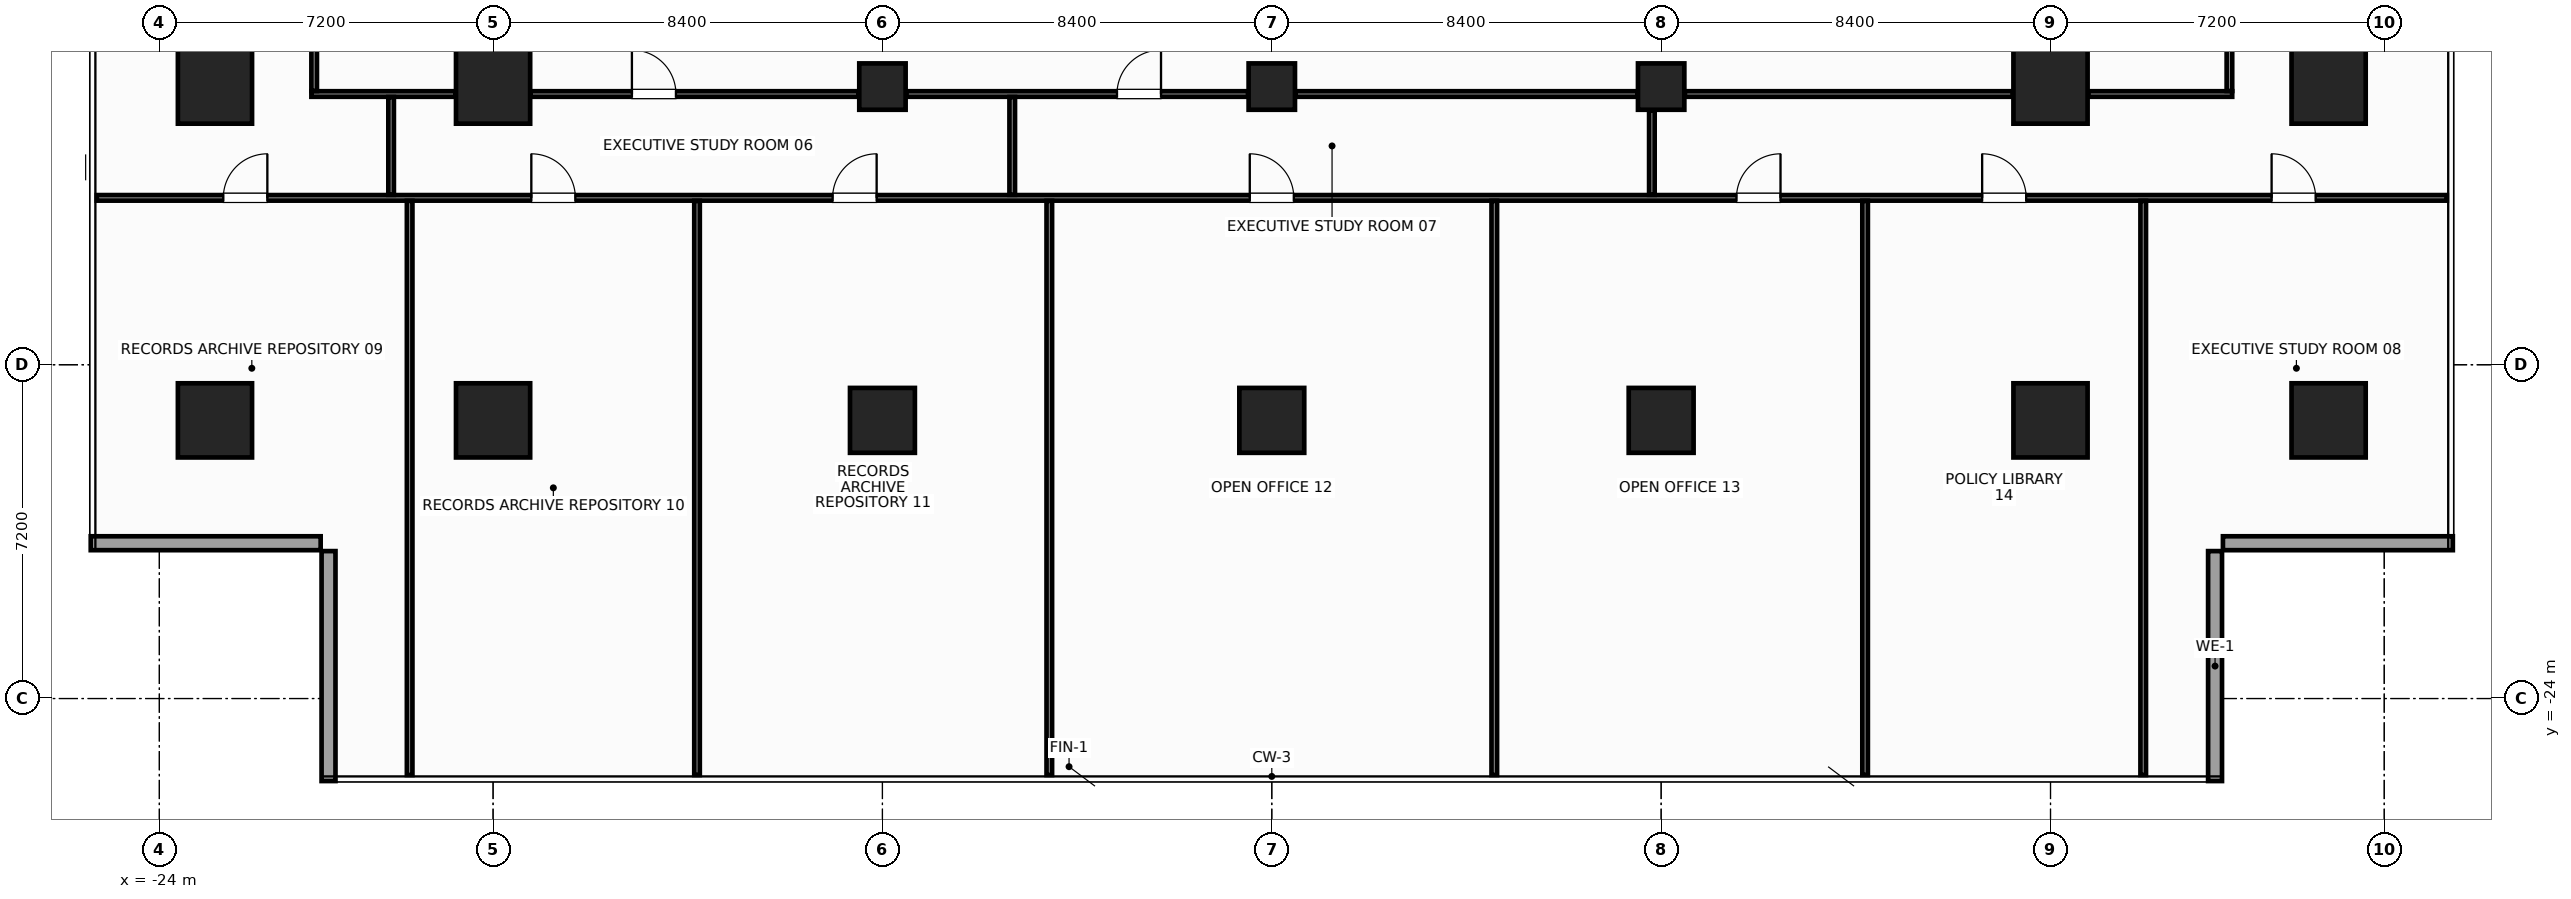
"""IFC4 building model, lengths in metres.
Left out: names, types, materials, properties, quantities, classifications, styles, units other than length and angle.
Written with IfcOpenShell. Run it as: python <this file> out.ifc"""

import sys

from ifc_helpers import new_model, si_unit, direction, frame, frame_2d, origin, origin_2d, place, context, subcontext, project, spatial, rectangle, hollow_rectangle, extrude, source, transform, mapped, element, fill, save


model = new_model("IFC4")
c1 = context("Model", 3, precision=1e-05, world=origin(), true_north=direction((0.0, 1.0)))
c2 = subcontext(c1, "Body", "Model", "MODEL_VIEW")
j1 = project(units=[si_unit("LENGTHUNIT", "METRE"), si_unit("PLANEANGLEUNIT", "RADIAN")], contexts=[c1])
p1 = place(None, origin())
s1 = spatial("IfcSite", under=j1, at=p1, CompositionType="ELEMENT")
p2 = place(p1, origin())
s2 = spatial("IfcBuilding", under=s1, at=p2, CompositionType="ELEMENT")
p3 = place(p2, frame((0.0, 0.0, 81.2)))
s3 = spatial("IfcBuildingStorey", under=s2, at=p3, CompositionType="ELEMENT", Elevation=81.2)
m1 = source(origin(), c2, "Body", "SweptSolid", [
    extrude(rectangle(XDim=1.6, YDim=1.6, at=origin_2d()), origin(), (0.0, 0.0, 1.0), 3.6),
])
for number, where, z_axis, x_axis in (
    (1, (-16.8, -18.0, 0.0), (0.0, 0.0, 1.0), (1.0, 0.0, 0.0)),
    (2, (-16.8, -10.8, 0.0), (0.0, 0.0, 1.0), (1.0, 0.0, 0.0)),
    (3, (16.8, -18.0, 0.0), (0.0, 0.0, 1.0), (1.0, 0.0, 0.0)),
    (4, (16.8, -10.8, 0.0), (0.0, 0.0, 1.0), (1.0, 0.0, 0.0)),
    (5, (-22.8, -18.0, 0.0), (0.0, 0.0, 1.0), (1.0, 0.0, 0.0)),
    (6, (-22.8, -10.8, 0.0), (0.0, 0.0, 1.0), (1.0, 0.0, 0.0)),
    (7, (22.8, -18.0, 0.0), (0.0, 0.0, 1.0), (1.0, 0.0, 0.0)),
    (8, (22.8, -10.8, 0.0), (0.0, 0.0, 1.0), (1.0, 0.0, 0.0)),
):
    element("IfcColumn", number, at=place(p3, frame(where, z_axis=z_axis, x_axis=x_axis)), inside=s3, PredefinedType="COLUMN", context=c2, shape_type="MappedRepresentation", body=[
        mapped(m1, transform((0.0, 0.0, 0.0), x_axis=(1.0, 0.0, 0.0), y_axis=(0.0, 1.0, 0.0), z_axis=(0.0, 0.0, 1.0), scale=1.0)),
    ])
m2 = source(origin(), c2, "Body", "SweptSolid", [
    extrude(rectangle(XDim=1.4, YDim=1.4, at=origin_2d()), origin(), (0.0, 0.0, 1.0), 3.6),
])
p4 = place(p3, frame((-8.4, -18.0, 0.0), z_axis=(0.0, 0.0, 1.0), x_axis=(1.0, 0.0, 0.0)))
e9 = element("IfcColumn", 9, at=p4, inside=s3, PredefinedType="COLUMN", context=c2, shape_type="MappedRepresentation", body=[
    mapped(m2, transform((0.0, 0.0, 0.0), x_axis=(1.0, 0.0, 0.0), y_axis=(0.0, 1.0, 0.0), z_axis=(0.0, 0.0, 1.0), scale=1.0)),
])
m3 = source(origin(), c2, "Body", "SweptSolid", [
    extrude(hollow_rectangle(XDim=1.0, YDim=1.0, WallThickness=0.045, at=origin_2d()), origin(), (0.0, 0.0, 1.0), 3.6),
])
p5 = place(p3, frame((-8.4, -10.8, 0.0), z_axis=(0.0, 0.0, 1.0), x_axis=(1.0, 0.0, 0.0)))
e10 = element("IfcColumn", 10, at=p5, inside=s3, PredefinedType="COLUMN", context=c2, shape_type="MappedRepresentation", body=[
    mapped(m3, transform((0.0, 0.0, 0.0), x_axis=(1.0, 0.0, 0.0), y_axis=(0.0, 1.0, 0.0), z_axis=(0.0, 0.0, 1.0), scale=1.0)),
])
p6 = place(p3, frame((8.4, -18.0, 0.0), z_axis=(0.0, 0.0, 1.0), x_axis=(1.0, 0.0, 0.0)))
e11 = element("IfcColumn", 11, at=p6, inside=s3, PredefinedType="COLUMN", context=c2, shape_type="MappedRepresentation", body=[
    mapped(m2, transform((0.0, 0.0, 0.0), x_axis=(1.0, 0.0, 0.0), y_axis=(0.0, 1.0, 0.0), z_axis=(0.0, 0.0, 1.0), scale=1.0)),
])
p7 = place(p3, frame((8.4, -10.8, 0.0), z_axis=(0.0, 0.0, 1.0), x_axis=(1.0, 0.0, 0.0)))
e12 = element("IfcColumn", 12, at=p7, inside=s3, PredefinedType="COLUMN", context=c2, shape_type="MappedRepresentation", body=[
    mapped(m3, transform((0.0, 0.0, 0.0), x_axis=(1.0, 0.0, 0.0), y_axis=(0.0, 1.0, 0.0), z_axis=(0.0, 0.0, 1.0), scale=1.0)),
])
p8 = place(p3, frame((0.0, -18.0, 0.0), z_axis=(0.0, 0.0, 1.0), x_axis=(1.0, 0.0, 0.0)))
e13 = element("IfcColumn", 13, at=p8, inside=s3, PredefinedType="COLUMN", context=c2, shape_type="MappedRepresentation", body=[
    mapped(m2, transform((0.0, 0.0, 0.0), x_axis=(1.0, 0.0, 0.0), y_axis=(0.0, 1.0, 0.0), z_axis=(0.0, 0.0, 1.0), scale=1.0)),
])
m4 = source(origin(), c2, "Body", "SweptSolid", [
    extrude(rectangle(XDim=1.0, YDim=1.0, at=origin_2d()), origin(), (0.0, 0.0, 1.0), 3.6),
])
p9 = place(p3, frame((0.0, -10.8, 0.0), z_axis=(0.0, 0.0, 1.0), x_axis=(1.0, 0.0, 0.0)))
e14 = element("IfcColumn", 14, at=p9, inside=s3, PredefinedType="COLUMN", context=c2, shape_type="MappedRepresentation", body=[
    mapped(m4, transform((0.0, 0.0, 0.0), x_axis=(1.0, 0.0, 0.0), y_axis=(0.0, 1.0, 0.0), z_axis=(0.0, 0.0, 1.0), scale=1.0)),
])
m5 = source(origin(), c2, "Body", "SweptSolid", [
    extrude(rectangle(XDim=4.96, YDim=0.3, at=frame_2d((2.48, 0.0))), origin(), (0.0, 0.0, 1.0), 2.74),
])
for number, where, z_axis, x_axis in (
    (15, (20.35, -25.78, 0.0), (0.0, 0.0, 1.0), (0.0, 1.0, 0.0)),
    (16, (20.52, -20.65, 0.0), (0.0, 0.0, 1.0), (1.0, 0.0, 0.0)),
    (17, (-25.48, -20.65, 0.0), (0.0, 0.0, 1.0), (1.0, 0.0, 0.0)),
    (18, (-20.35, -20.82, 0.0), (0.0, 0.0, 1.0), (0.0, -1.0, 0.0)),
):
    element("IfcWall", number, at=place(p3, frame(where, z_axis=z_axis, x_axis=x_axis)), inside=s3, PredefinedType="STANDARD", context=c2, shape_type="MappedRepresentation", body=[
        mapped(m5, transform((0.0, 0.0, 0.0), x_axis=(1.0, 0.0, 0.0), y_axis=(0.0, 1.0, 0.0), z_axis=(0.0, 0.0, 1.0), scale=1.0)),
    ])
m6 = source(origin(), c2, "Body", "SweptSolid", [
    extrude(rectangle(XDim=3.11, YDim=0.12, at=frame_2d((1.555, 0.0))), origin(), (0.0, 0.0, 1.0), 2.745),
])
p10 = place(p3, frame((-20.72, -10.96, 0.0), z_axis=(0.0, 0.0, 1.0), x_axis=(1.0, 0.0, 0.0)))
e19 = element("IfcWall", 19, at=p10, inside=s3, PredefinedType="PARTITIONING", context=c2, shape_type="MappedRepresentation", body=[
    mapped(m6, transform((0.0, 0.0, 0.0), x_axis=(1.0, 0.0, 0.0), y_axis=(0.0, 1.0, 0.0), z_axis=(0.0, 0.0, 1.0), scale=1.0)),
])
m7 = source(origin(), c2, "Body", "SweptSolid", [
    extrude(rectangle(XDim=7.08, YDim=0.12, at=frame_2d((3.54, 0.0))), origin(), (0.0, 0.0, 1.0), 2.745),
])
p11 = place(p3, frame((-15.99, -10.96, 0.0), z_axis=(0.0, 0.0, 1.0), x_axis=(1.0, 0.0, 0.0)))
e20 = element("IfcWall", 20, at=p11, inside=s3, PredefinedType="PARTITIONING", context=c2, shape_type="MappedRepresentation", body=[
    mapped(m7, transform((0.0, 0.0, 0.0), x_axis=(1.0, 0.0, 0.0), y_axis=(0.0, 1.0, 0.0), z_axis=(0.0, 0.0, 1.0), scale=1.0)),
])
p12 = place(p11, frame((2.185, 0.0, 0.0)))
e21 = element("IfcOpeningElement", 21, at=p12, cuts=e20, PredefinedType="OPENING", context=c2, shape_type="SweptSolid", body=[
    extrude(rectangle(XDim=0.95, YDim=2.15, at=frame_2d((0.475, 1.075))), frame((0.0, 0.072, 0.0), z_axis=(0.0, -1.0, 0.0), x_axis=(1.0, 0.0, 0.0)), (0.0, 0.0, 1.0), 0.144),
])
m8 = source(origin(), c2, "Body", "SweptSolid", [
    extrude(rectangle(XDim=7.38, YDim=0.12, at=frame_2d((3.69, 0.0))), origin(), (0.0, 0.0, 1.0), 2.745),
])
p13 = place(p3, frame((-7.89, -10.96, 0.0), z_axis=(0.0, 0.0, 1.0), x_axis=(1.0, 0.0, 0.0)))
e22 = element("IfcWall", 22, at=p13, inside=s3, PredefinedType="PARTITIONING", context=c2, shape_type="MappedRepresentation", body=[
    mapped(m8, transform((0.0, 0.0, 0.0), x_axis=(1.0, 0.0, 0.0), y_axis=(0.0, 1.0, 0.0), z_axis=(0.0, 0.0, 1.0), scale=1.0)),
])
p14 = place(p13, frame((4.55, 0.0, 0.0)))
e23 = element("IfcOpeningElement", 23, at=p14, cuts=e22, PredefinedType="OPENING", context=c2, shape_type="SweptSolid", body=[
    extrude(rectangle(XDim=0.95, YDim=2.15, at=frame_2d((0.475, 1.075))), frame((0.0, 0.072, 0.0), z_axis=(0.0, -1.0, 0.0), x_axis=(1.0, 0.0, 0.0)), (0.0, 0.0, 1.0), 0.144),
])
p15 = place(p3, frame((0.51, -10.96, 0.0), z_axis=(0.0, 0.0, 1.0), x_axis=(1.0, 0.0, 0.0)))
e24 = element("IfcWall", 24, at=p15, inside=s3, PredefinedType="PARTITIONING", context=c2, shape_type="MappedRepresentation", body=[
    mapped(m8, transform((0.0, 0.0, 0.0), x_axis=(1.0, 0.0, 0.0), y_axis=(0.0, 1.0, 0.0), z_axis=(0.0, 0.0, 1.0), scale=1.0)),
])
p16 = place(p3, frame((8.91, -10.96, 0.0), z_axis=(0.0, 0.0, 1.0), x_axis=(1.0, 0.0, 0.0)))
e25 = element("IfcWall", 25, at=p16, inside=s3, PredefinedType="PARTITIONING", context=c2, shape_type="MappedRepresentation", body=[
    mapped(m7, transform((0.0, 0.0, 0.0), x_axis=(1.0, 0.0, 0.0), y_axis=(0.0, 1.0, 0.0), z_axis=(0.0, 0.0, 1.0), scale=1.0)),
])
p17 = place(p3, frame((17.61, -10.96, 0.0), z_axis=(0.0, 0.0, 1.0), x_axis=(1.0, 0.0, 0.0)))
e26 = element("IfcWall", 26, at=p17, inside=s3, PredefinedType="PARTITIONING", context=c2, shape_type="MappedRepresentation", body=[
    mapped(m6, transform((0.0, 0.0, 0.0), x_axis=(1.0, 0.0, 0.0), y_axis=(0.0, 1.0, 0.0), z_axis=(0.0, 0.0, 1.0), scale=1.0)),
])
m9 = source(origin(), c2, "Body", "SweptSolid", [
    extrude(rectangle(XDim=2.09, YDim=0.12, at=frame_2d((1.045, 0.0))), origin(), (0.0, 0.0, 1.0), 3.36),
])
for number, where, z_axis, x_axis in (
    (27, (-20.66, -10.895, 0.0), (0.0, 0.0, 1.0), (0.0, 1.0, 0.0)),
    (28, (20.66, -10.895, 0.0), (0.0, 0.0, 1.0), (0.0, 1.0, 0.0)),
):
    element("IfcWall", number, at=place(p3, frame(where, z_axis=z_axis, x_axis=x_axis)), inside=s3, PredefinedType="PARTITIONING", context=c2, shape_type="MappedRepresentation", body=[
        mapped(m9, transform((0.0, 0.0, 0.0), x_axis=(1.0, 0.0, 0.0), y_axis=(0.0, 1.0, 0.0), z_axis=(0.0, 0.0, 1.0), scale=1.0)),
    ])
m10 = source(origin(), c2, "Body", "SweptSolid", [
    extrude(rectangle(XDim=50.7, YDim=0.12, at=frame_2d((25.35, 0.0))), origin(), (0.0, 0.0, 1.0), 2.945),
])
p18 = place(p3, frame((-25.35, -13.2, 0.0), z_axis=(0.0, 0.0, 1.0), x_axis=(1.0, 0.0, 0.0)))
e29 = element("IfcWall", 29, at=p18, inside=s3, PredefinedType="PARTITIONING", context=c2, shape_type="MappedRepresentation", body=[
    mapped(m10, transform((0.0, 0.0, 0.0), x_axis=(1.0, 0.0, 0.0), y_axis=(0.0, 1.0, 0.0), z_axis=(0.0, 0.0, 1.0), scale=1.0)),
])
p19 = place(p18, frame((46.92, 0.0, 0.0)))
e30 = element("IfcOpeningElement", 30, at=p19, cuts=e29, PredefinedType="OPENING", context=c2, shape_type="SweptSolid", body=[
    extrude(rectangle(XDim=0.95, YDim=2.15, at=frame_2d((0.475, 1.075))), frame((0.0, 0.072, 0.0), z_axis=(0.0, -1.0, 0.0), x_axis=(1.0, 0.0, 0.0)), (0.0, 0.0, 1.0), 0.144),
])
p20 = place(p18, frame((2.73, 0.0, 0.0)))
e31 = element("IfcOpeningElement", 31, at=p20, cuts=e29, PredefinedType="OPENING", context=c2, shape_type="SweptSolid", body=[
    extrude(rectangle(XDim=0.95, YDim=2.15, at=frame_2d((0.475, 1.075))), frame((0.0, 0.072, 0.0), z_axis=(0.0, -1.0, 0.0), x_axis=(1.0, 0.0, 0.0)), (0.0, 0.0, 1.0), 0.144),
])
p21 = place(p18, frame((9.375, 0.0, 0.0)))
e32 = element("IfcOpeningElement", 32, at=p21, cuts=e29, PredefinedType="OPENING", context=c2, shape_type="SweptSolid", body=[
    extrude(rectangle(XDim=0.95, YDim=2.15, at=frame_2d((0.475, 1.075))), frame((0.0, 0.072, 0.0), z_axis=(0.0, -1.0, 0.0), x_axis=(1.0, 0.0, 0.0)), (0.0, 0.0, 1.0), 0.144),
])
p22 = place(p18, frame((15.875, 0.0, 0.0)))
e33 = element("IfcOpeningElement", 33, at=p22, cuts=e29, PredefinedType="OPENING", context=c2, shape_type="SweptSolid", body=[
    extrude(rectangle(XDim=0.95, YDim=2.15, at=frame_2d((0.475, 1.075))), frame((0.0, 0.072, 0.0), z_axis=(0.0, -1.0, 0.0), x_axis=(1.0, 0.0, 0.0)), (0.0, 0.0, 1.0), 0.144),
])
p23 = place(p18, frame((24.875, 0.0, 0.0)))
e34 = element("IfcOpeningElement", 34, at=p23, cuts=e29, PredefinedType="OPENING", context=c2, shape_type="SweptSolid", body=[
    extrude(rectangle(XDim=0.95, YDim=2.15, at=frame_2d((0.475, 1.075))), frame((0.0, 0.072, 0.0), z_axis=(0.0, -1.0, 0.0), x_axis=(1.0, 0.0, 0.0)), (0.0, 0.0, 1.0), 0.144),
])
p24 = place(p18, frame((35.375, 0.0, 0.0)))
e35 = element("IfcOpeningElement", 35, at=p24, cuts=e29, PredefinedType="OPENING", context=c2, shape_type="SweptSolid", body=[
    extrude(rectangle(XDim=0.95, YDim=2.15, at=frame_2d((0.475, 1.075))), frame((0.0, 0.072, 0.0), z_axis=(0.0, -1.0, 0.0), x_axis=(1.0, 0.0, 0.0)), (0.0, 0.0, 1.0), 0.144),
])
p25 = place(p18, frame((40.675, 0.0, 0.0)))
e36 = element("IfcOpeningElement", 36, at=p25, cuts=e29, PredefinedType="OPENING", context=c2, shape_type="SweptSolid", body=[
    extrude(rectangle(XDim=0.95, YDim=2.15, at=frame_2d((0.475, 1.075))), frame((0.0, 0.072, 0.0), z_axis=(0.0, -1.0, 0.0), x_axis=(1.0, 0.0, 0.0)), (0.0, 0.0, 1.0), 0.144),
])
m11 = source(origin(), c2, "Body", "SweptSolid", [
    extrude(rectangle(XDim=2.11, YDim=0.12, at=frame_2d((1.055, 0.0))), origin(), (0.0, 0.0, 1.0), 3.36),
])
for number, where, z_axis, x_axis in (
    (37, (-19.0, -13.135, 0.0), (0.0, 0.0, 1.0), (0.0, 1.0, 0.0)),
    (38, (-5.6, -13.135, 0.0), (0.0, 0.0, 1.0), (0.0, 1.0, 0.0)),
):
    element("IfcWall", number, at=place(p3, frame(where, z_axis=z_axis, x_axis=x_axis)), inside=s3, PredefinedType="PARTITIONING", context=c2, shape_type="MappedRepresentation", body=[
        mapped(m11, transform((0.0, 0.0, 0.0), x_axis=(1.0, 0.0, 0.0), y_axis=(0.0, 1.0, 0.0), z_axis=(0.0, 0.0, 1.0), scale=1.0)),
    ])
m12 = source(origin(), c2, "Body", "SweptSolid", [
    extrude(rectangle(XDim=1.825, YDim=0.12, at=frame_2d((0.913, 0.0))), origin(), (0.0, 0.0, 1.0), 2.945),
])
p26 = place(p3, frame((8.2, -13.135, 0.0), z_axis=(0.0, 0.0, 1.0), x_axis=(0.0, 1.0, 0.0)))
e39 = element("IfcWall", 39, at=p26, inside=s3, PredefinedType="PARTITIONING", context=c2, shape_type="MappedRepresentation", body=[
    mapped(m12, transform((0.0, 0.0, 0.0), x_axis=(1.0, 0.0, 0.0), y_axis=(0.0, 1.0, 0.0), z_axis=(0.0, 0.0, 1.0), scale=1.0)),
])
m13 = source(origin(), c2, "Body", "SweptSolid", [
    extrude(rectangle(XDim=12.385, YDim=0.12, at=frame_2d((6.192, 0.0))), origin(), (0.0, 0.0, 1.0), 2.745),
])
for number, where, z_axis, x_axis in (
    (40, (-18.6, -25.65, 0.0), (0.0, 0.0, 1.0), (0.0, 1.0, 0.0)),
    (41, (-12.4, -25.65, 0.0), (0.0, 0.0, 1.0), (0.0, 1.0, 0.0)),
    (42, (-4.8, -25.65, 0.0), (0.0, 0.0, 1.0), (0.0, 1.0, 0.0)),
    (43, (4.8, -25.65, 0.0), (0.0, 0.0, 1.0), (0.0, 1.0, 0.0)),
    (44, (12.8, -25.65, 0.0), (0.0, 0.0, 1.0), (0.0, 1.0, 0.0)),
    (45, (18.8, -25.65, 0.0), (0.0, 0.0, 1.0), (0.0, 1.0, 0.0)),
):
    element("IfcWall", number, at=place(p3, frame(where, z_axis=z_axis, x_axis=x_axis)), inside=s3, PredefinedType="PARTITIONING", context=c2, shape_type="MappedRepresentation", body=[
        mapped(m13, transform((0.0, 0.0, 0.0), x_axis=(1.0, 0.0, 0.0), y_axis=(0.0, 1.0, 0.0), z_axis=(0.0, 0.0, 1.0), scale=1.0)),
    ])
m14 = source(origin(), c2, "Body", "SweptSolid", [
    extrude(rectangle(XDim=0.95, YDim=2.15, at=frame_2d((0.475, 1.075))), frame((0.0, 0.025, 0.0), z_axis=(0.0, -1.0, 0.0), x_axis=(1.0, 0.0, 0.0)), (0.0, 0.0, 1.0), 0.05),
])
p27 = place(p12, origin())
e46 = element("IfcDoor", 46, at=p27, inside=s3, OperationType="SINGLE_SWING_LEFT", PredefinedType="DOOR", context=c2, shape_type="MappedRepresentation", body=[
    mapped(m14, transform((0.0, 0.0, 0.0), x_axis=(1.0, 0.0, 0.0), y_axis=(0.0, 1.0, 0.0), z_axis=(0.0, 0.0, 1.0), scale=1.0)),
])
fill(e21, e46)
p28 = place(p14, origin())
e47 = element("IfcDoor", 47, at=p28, inside=s3, OperationType="SINGLE_SWING_RIGHT", PredefinedType="DOOR", context=c2, shape_type="MappedRepresentation", body=[
    mapped(m14, transform((0.0, 0.0, 0.0), x_axis=(1.0, 0.0, 0.0), y_axis=(0.0, 1.0, 0.0), z_axis=(0.0, 0.0, 1.0), scale=1.0)),
])
fill(e23, e47)
p29 = place(p19, origin())
e48 = element("IfcDoor", 48, at=p29, inside=s3, OperationType="SINGLE_SWING_LEFT", PredefinedType="DOOR", context=c2, shape_type="MappedRepresentation", body=[
    mapped(m14, transform((0.0, 0.0, 0.0), x_axis=(1.0, 0.0, 0.0), y_axis=(0.0, 1.0, 0.0), z_axis=(0.0, 0.0, 1.0), scale=1.0)),
])
fill(e30, e48)
p30 = place(p20, origin())
e49 = element("IfcDoor", 49, at=p30, inside=s3, OperationType="SINGLE_SWING_RIGHT", PredefinedType="DOOR", context=c2, shape_type="MappedRepresentation", body=[
    mapped(m14, transform((0.0, 0.0, 0.0), x_axis=(1.0, 0.0, 0.0), y_axis=(0.0, 1.0, 0.0), z_axis=(0.0, 0.0, 1.0), scale=1.0)),
])
fill(e31, e49)
p31 = place(p21, origin())
e50 = element("IfcDoor", 50, at=p31, inside=s3, OperationType="SINGLE_SWING_LEFT", PredefinedType="DOOR", context=c2, shape_type="MappedRepresentation", body=[
    mapped(m14, transform((0.0, 0.0, 0.0), x_axis=(1.0, 0.0, 0.0), y_axis=(0.0, 1.0, 0.0), z_axis=(0.0, 0.0, 1.0), scale=1.0)),
])
fill(e32, e50)
p32 = place(p22, origin())
e51 = element("IfcDoor", 51, at=p32, inside=s3, OperationType="SINGLE_SWING_RIGHT", PredefinedType="DOOR", context=c2, shape_type="MappedRepresentation", body=[
    mapped(m14, transform((0.0, 0.0, 0.0), x_axis=(1.0, 0.0, 0.0), y_axis=(0.0, 1.0, 0.0), z_axis=(0.0, 0.0, 1.0), scale=1.0)),
])
fill(e33, e51)
p33 = place(p23, origin())
e52 = element("IfcDoor", 52, at=p33, inside=s3, OperationType="SINGLE_SWING_LEFT", PredefinedType="DOOR", context=c2, shape_type="MappedRepresentation", body=[
    mapped(m14, transform((0.0, 0.0, 0.0), x_axis=(1.0, 0.0, 0.0), y_axis=(0.0, 1.0, 0.0), z_axis=(0.0, 0.0, 1.0), scale=1.0)),
])
fill(e34, e52)
p34 = place(p24, origin())
e53 = element("IfcDoor", 53, at=p34, inside=s3, OperationType="SINGLE_SWING_RIGHT", PredefinedType="DOOR", context=c2, shape_type="MappedRepresentation", body=[
    mapped(m14, transform((0.0, 0.0, 0.0), x_axis=(1.0, 0.0, 0.0), y_axis=(0.0, 1.0, 0.0), z_axis=(0.0, 0.0, 1.0), scale=1.0)),
])
fill(e35, e53)
p35 = place(p25, origin())
e54 = element("IfcDoor", 54, at=p35, inside=s3, OperationType="SINGLE_SWING_LEFT", PredefinedType="DOOR", context=c2, shape_type="MappedRepresentation", body=[
    mapped(m14, transform((0.0, 0.0, 0.0), x_axis=(1.0, 0.0, 0.0), y_axis=(0.0, 1.0, 0.0), z_axis=(0.0, 0.0, 1.0), scale=1.0)),
])
fill(e36, e54)
save(model, sys.argv[1])
